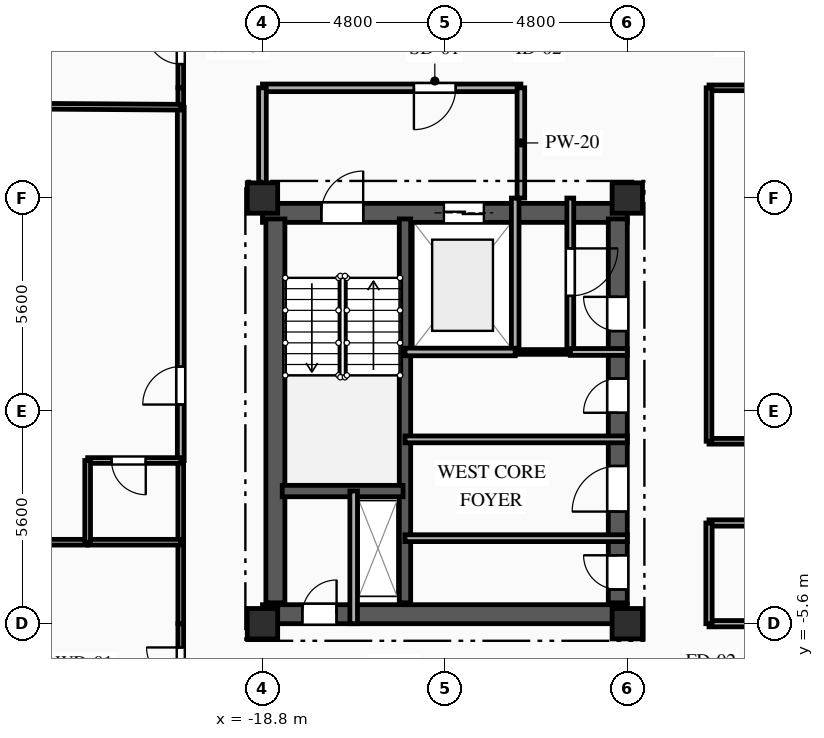
"""IFC4 building model, lengths in metres.
Left out: names, types, materials, properties, quantities, classifications, styles, units other than length and angle.
Written with IfcOpenShell. Run it as: python <this file> out.ifc"""

import sys

from ifc_helpers import new_model, si_unit, direction, frame, frame_2d, origin, origin_2d, place, context, subcontext, project, spatial, rectangle, extrude, element, fill, save


model = new_model("IFC4")
c1 = context("Model", 3, precision=1e-05, world=origin(), true_north=direction((0.0, 1.0)))
c2 = subcontext(c1, "Body", "Model", "MODEL_VIEW")
j1 = project(units=[si_unit("LENGTHUNIT", "METRE"), si_unit("PLANEANGLEUNIT", "RADIAN")], contexts=[c1])
p1 = place(None, origin())
s1 = spatial("IfcSite", under=j1, at=p1, CompositionType="ELEMENT")
p2 = place(p1, origin())
s2 = spatial("IfcBuilding", under=s1, at=p2, CompositionType="ELEMENT")
p3 = place(p2, frame((0.0, 0.0, 213.15)))
s3 = spatial("IfcBuildingStorey", under=s2, at=p3, CompositionType="ELEMENT", Elevation=213.15)
for number, where, z_axis, x_axis in (
    (1, (-18.8, -5.6, 0.0), (0.0, 0.0, 1.0), (1.0, 0.0, 0.0)),
    (2, (-18.8, 5.6, 0.0), (0.0, 0.0, 1.0), (1.0, 0.0, 0.0)),
    (3, (-9.2, -5.6, 0.0), (0.0, 0.0, 1.0), (1.0, 0.0, 0.0)),
    (4, (-9.2, 5.6, 0.0), (0.0, 0.0, 1.0), (1.0, 0.0, 0.0)),
):
    element("IfcColumn", number, at=place(p3, frame(where, z_axis=z_axis, x_axis=x_axis)), inside=s3, PredefinedType="COLUMN", context=c2, shape_type="SweptSolid", body=[
        extrude(rectangle(XDim=0.8, YDim=0.8, at=origin_2d()), origin(), (0.0, 0.0, 1.0), 3.35),
    ])
p4 = place(p3, frame((-18.8, 5.21, 0.0), z_axis=(0.0, 0.0, 1.0), x_axis=(1.0, 0.0, 0.0)))
e5 = element("IfcWall", 5, at=p4, inside=s3, PredefinedType="SHEAR", context=c2, shape_type="SweptSolid", body=[
    extrude(rectangle(XDim=9.6, YDim=0.5, at=frame_2d((4.8, 0.0))), origin(), (0.0, 0.0, 1.0), 3.04),
])
p5 = place(p4, frame((1.55, 0.0, 0.0)))
e6 = element("IfcOpeningElement", 6, at=p5, cuts=e5, PredefinedType="OPENING", context=c2, shape_type="SweptSolid", body=[
    extrude(rectangle(XDim=1.1, YDim=2.15, at=frame_2d((0.55, 1.075))), frame((0.0, 0.26, 0.0), z_axis=(0.0, -1.0, 0.0), x_axis=(1.0, 0.0, 0.0)), (0.0, 0.0, 1.0), 0.52),
])
p6 = place(p4, frame((4.775, 0.0, 0.0)))
e7 = element("IfcOpeningElement", 7, at=p6, cuts=e5, PredefinedType="OPENING", context=c2, shape_type="SweptSolid", body=[
    extrude(rectangle(XDim=1.05, YDim=2.1, at=frame_2d((0.525, 1.05))), frame((0.0, 0.26, 0.0), z_axis=(0.0, -1.0, 0.0), x_axis=(1.0, 0.0, 0.0)), (0.0, 0.0, 1.0), 0.52),
])
p7 = place(p3, frame((-18.8, -5.35, 0.0), z_axis=(0.0, 0.0, 1.0), x_axis=(1.0, 0.0, 0.0)))
e8 = element("IfcWall", 8, at=p7, inside=s3, PredefinedType="SHEAR", context=c2, shape_type="SweptSolid", body=[
    extrude(rectangle(XDim=9.6, YDim=0.5, at=frame_2d((4.8, 0.0))), origin(), (0.0, 0.0, 1.0), 3.04),
])
p8 = place(p7, frame((1.05, 0.0, 0.0)))
e9 = element("IfcOpeningElement", 9, at=p8, cuts=e8, PredefinedType="OPENING", context=c2, shape_type="SweptSolid", body=[
    extrude(rectangle(XDim=0.9, YDim=2.1, at=frame_2d((0.45, 1.05))), frame((0.0, 0.26, 0.0), z_axis=(0.0, -1.0, 0.0), x_axis=(1.0, 0.0, 0.0)), (0.0, 0.0, 1.0), 0.52),
])
p9 = place(p3, frame((-18.46, -5.05, 0.0), z_axis=(0.0, 0.0, 1.0), x_axis=(0.0, 1.0, 0.0)))
e10 = element("IfcWall", 10, at=p9, inside=s3, PredefinedType="SHEAR", context=c2, shape_type="SweptSolid", body=[
    extrude(rectangle(XDim=10.1, YDim=0.5, at=frame_2d((5.05, 0.0))), origin(), (0.0, 0.0, 1.0), 3.04),
])
p10 = place(p3, frame((-9.45, -5.05, 0.0), z_axis=(0.0, 0.0, 1.0), x_axis=(0.0, 1.0, 0.0)))
e11 = element("IfcWall", 11, at=p10, inside=s3, PredefinedType="SHEAR", context=c2, shape_type="SweptSolid", body=[
    extrude(rectangle(XDim=10.1, YDim=0.5, at=frame_2d((5.05, 0.0))), origin(), (0.0, 0.0, 1.0), 3.04),
])
p11 = place(p10, frame((7.15, 0.0, 0.0)))
e12 = element("IfcOpeningElement", 12, at=p11, cuts=e11, PredefinedType="OPENING", context=c2, shape_type="SweptSolid", body=[
    extrude(rectangle(XDim=0.9, YDim=2.1, at=frame_2d((0.45, 1.05))), frame((0.0, 0.26, 0.0), z_axis=(0.0, -1.0, 0.0), x_axis=(1.0, 0.0, 0.0)), (0.0, 0.0, 1.0), 0.52),
])
p12 = place(p10, frame((2.4, 0.0, 0.0)))
e13 = element("IfcOpeningElement", 13, at=p12, cuts=e11, PredefinedType="OPENING", context=c2, shape_type="SweptSolid", body=[
    extrude(rectangle(XDim=1.2, YDim=2.15, at=frame_2d((0.6, 1.075))), frame((0.0, 0.26, 0.0), z_axis=(0.0, -1.0, 0.0), x_axis=(1.0, 0.0, 0.0)), (0.0, 0.0, 1.0), 0.52),
])
p13 = place(p10, frame((0.35, 0.0, 0.0)))
e14 = element("IfcOpeningElement", 14, at=p13, cuts=e11, PredefinedType="OPENING", context=c2, shape_type="SweptSolid", body=[
    extrude(rectangle(XDim=0.9, YDim=2.1, at=frame_2d((0.45, 1.05))), frame((0.0, 0.26, 0.0), z_axis=(0.0, -1.0, 0.0), x_axis=(1.0, 0.0, 0.0)), (0.0, 0.0, 1.0), 0.52),
])
p14 = place(p10, frame((5.0, 0.0, 0.0)))
e15 = element("IfcOpeningElement", 15, at=p14, cuts=e11, PredefinedType="OPENING", context=c2, shape_type="SweptSolid", body=[
    extrude(rectangle(XDim=0.9, YDim=2.1, at=frame_2d((0.45, 1.05))), frame((0.0, 0.26, 0.0), z_axis=(0.0, -1.0, 0.0), x_axis=(1.0, 0.0, 0.0)), (0.0, 0.0, 1.0), 0.52),
])
p15 = place(p3, frame((-15.05, -5.05, 0.0), z_axis=(0.0, 0.0, 1.0), x_axis=(0.0, 1.0, 0.0)))
e16 = element("IfcWall", 16, at=p15, inside=s3, PredefinedType="SHEAR", context=c2, shape_type="SweptSolid", body=[
    extrude(rectangle(XDim=10.1, YDim=0.3, at=frame_2d((5.05, 0.0))), origin(), (0.0, 0.0, 1.0), 3.04),
])
p16 = place(p3, frame((-18.28, -2.11, 0.0), z_axis=(0.0, 0.0, 1.0), x_axis=(1.0, 0.0, 0.0)))
e17 = element("IfcWall", 17, at=p16, inside=s3, PredefinedType="SHEAR", context=c2, shape_type="SweptSolid", body=[
    extrude(rectangle(XDim=3.18, YDim=0.3, at=frame_2d((1.59, 0.0))), origin(), (0.0, 0.0, 1.0), 3.04),
])
p17 = place(p3, frame((-16.4, -5.6, 0.0), z_axis=(0.0, 0.0, 1.0), x_axis=(0.0, 1.0, 0.0)))
e18 = element("IfcWall", 18, at=p17, inside=s3, PredefinedType="PARTITIONING", context=c2, shape_type="SweptSolid", body=[
    extrude(rectangle(XDim=3.49, YDim=0.2, at=frame_2d((1.745, 0.0))), origin(), (0.0, 0.0, 1.0), 3.04),
])
p18 = place(p3, frame((-12.15, 1.55, 0.0), z_axis=(0.0, 0.0, 1.0), x_axis=(0.0, 1.0, 0.0)))
e19 = element("IfcWall", 19, at=p18, inside=s3, PredefinedType="PARTITIONING", context=c2, shape_type="SweptSolid", body=[
    extrude(rectangle(XDim=4.05, YDim=0.2, at=frame_2d((2.025, 0.0))), origin(), (0.0, 0.0, 1.0), 3.04),
])
p19 = place(p3, frame((-12.0, 8.5, 0.0), z_axis=(0.0, 0.0, 1.0), x_axis=(-1.0, 0.0, 0.0)))
e20 = element("IfcWall", 20, at=p19, inside=s3, PredefinedType="PARTITIONING", context=c2, shape_type="SweptSolid", body=[
    extrude(rectangle(XDim=6.8, YDim=0.2, at=frame_2d((3.4, 0.0))), origin(), (0.0, 0.0, 1.0), 3.04),
])
p20 = place(p19, frame((1.715, 0.0, 0.0)))
e21 = element("IfcOpeningElement", 21, at=p20, cuts=e20, PredefinedType="OPENING", context=c2, shape_type="SweptSolid", body=[
    extrude(rectangle(XDim=1.1, YDim=2.15, at=frame_2d((0.55, 1.075))), frame((0.0, 0.11, 0.0), z_axis=(0.0, -1.0, 0.0), x_axis=(1.0, 0.0, 0.0)), (0.0, 0.0, 1.0), 0.22),
])
p21 = place(p3, frame((-18.8, 8.5, 0.0), z_axis=(0.0, 0.0, 1.0), x_axis=(0.0, -1.0, 0.0)))
e22 = element("IfcWall", 22, at=p21, inside=s3, PredefinedType="PARTITIONING", context=c2, shape_type="SweptSolid", body=[
    extrude(rectangle(XDim=2.9, YDim=0.2, at=frame_2d((1.45, 0.0))), origin(), (0.0, 0.0, 1.0), 2.665),
])
p22 = place(p3, frame((-12.0, 5.6, 0.0), z_axis=(0.0, 0.0, 1.0), x_axis=(0.0, 1.0, 0.0)))
e23 = element("IfcWall", 23, at=p22, inside=s3, PredefinedType="PARTITIONING", context=c2, shape_type="SweptSolid", body=[
    extrude(rectangle(XDim=2.9, YDim=0.2, at=frame_2d((1.45, 0.0))), origin(), (0.0, 0.0, 1.0), 3.04),
])
p23 = place(p3, frame((-10.7, 5.6, 0.0), z_axis=(0.0, 0.0, 1.0), x_axis=(0.0, -1.0, 0.0)))
e24 = element("IfcWall", 24, at=p23, inside=s3, PredefinedType="PARTITIONING", context=c2, shape_type="SweptSolid", body=[
    extrude(rectangle(XDim=4.05, YDim=0.18, at=frame_2d((2.025, 0.0))), origin(), (0.0, 0.0, 1.0), 3.04),
])
p24 = place(p23, frame((1.325, 0.0, 0.0)))
e25 = element("IfcOpeningElement", 25, at=p24, cuts=e24, PredefinedType="OPENING", context=c2, shape_type="SweptSolid", body=[
    extrude(rectangle(XDim=1.25, YDim=2.2, at=frame_2d((0.625, 1.1))), frame((0.0, 0.1, 0.0), z_axis=(0.0, -1.0, 0.0), x_axis=(1.0, 0.0, 0.0)), (0.0, 0.0, 1.0), 0.2),
])
p25 = place(p3, frame((-10.7, 1.55, 0.0), z_axis=(0.0, 0.0, 1.0), x_axis=(1.0, 0.0, 0.0)))
e26 = element("IfcWall", 26, at=p25, inside=s3, PredefinedType="PARTITIONING", context=c2, shape_type="SweptSolid", body=[
    extrude(rectangle(XDim=1.5, YDim=0.18, at=frame_2d((0.75, 0.0))), origin(), (0.0, 0.0, 1.0), 3.04),
])
p26 = place(p3, frame((-12.15, 1.55, 0.0), z_axis=(0.0, 0.0, 1.0), x_axis=(1.0, 0.0, 0.0)))
e27 = element("IfcWall", 27, at=p26, inside=s3, PredefinedType="PARTITIONING", context=c2, shape_type="SweptSolid", body=[
    extrude(rectangle(XDim=1.45, YDim=0.125, at=frame_2d((0.725, 0.0))), origin(), (0.0, 0.0, 1.0), 3.04),
])
p27 = place(p3, frame((-15.05, -3.35, 0.0), z_axis=(0.0, 0.0, 1.0), x_axis=(1.0, 0.0, 0.0)))
e28 = element("IfcWall", 28, at=p27, inside=s3, PredefinedType="PARTITIONING", context=c2, shape_type="SweptSolid", body=[
    extrude(rectangle(XDim=5.85, YDim=0.18, at=frame_2d((2.925, 0.0))), origin(), (0.0, 0.0, 1.0), 2.755),
])
p28 = place(p3, frame((-9.2, -0.75, 0.0), z_axis=(0.0, 0.0, 1.0), x_axis=(-1.0, 0.0, 0.0)))
e29 = element("IfcWall", 29, at=p28, inside=s3, PredefinedType="PARTITIONING", context=c2, shape_type="SweptSolid", body=[
    extrude(rectangle(XDim=5.85, YDim=0.18, at=frame_2d((2.925, 0.0))), origin(), (0.0, 0.0, 1.0), 3.04),
])
p29 = place(p3, frame((-20.95, 8.5, 0.0), z_axis=(0.0, 0.0, 1.0), x_axis=(0.0, 1.0, 0.0)))
e30 = element("IfcWall", 30, at=p29, inside=s3, PredefinedType="PARTITIONING", context=c2, shape_type="SweptSolid", body=[
    extrude(rectangle(XDim=2.15, YDim=0.15, at=frame_2d((1.075, 0.0))), origin(), (0.0, 0.0, 1.0), 3.04),
])
p30 = place(p29, frame((0.625, 0.0, 0.0)))
e31 = element("IfcOpeningElement", 31, at=p30, cuts=e30, PredefinedType="OPENING", context=c2, shape_type="SweptSolid", body=[
    extrude(rectangle(XDim=0.9, YDim=2.1, at=frame_2d((0.45, 1.05))), frame((0.0, 0.085, 0.0), z_axis=(0.0, -1.0, 0.0), x_axis=(1.0, 0.0, 0.0)), (0.0, 0.0, 1.0), 0.17),
])
p31 = place(p3, frame((0.0, 8.5, 0.0), z_axis=(0.0, 0.0, 1.0), x_axis=(-1.0, 0.0, 0.0)))
e32 = element("IfcWall", 32, at=p31, inside=s3, PredefinedType="PARTITIONING", context=c2, shape_type="SweptSolid", body=[
    extrude(rectangle(XDim=7.05, YDim=0.15, at=frame_2d((3.525, 0.0))), origin(), (0.0, 0.0, 1.0), 3.04),
])
p32 = place(p3, frame((-20.95, -7.75, 0.0), z_axis=(0.0, 0.0, 1.0), x_axis=(0.0, 1.0, 0.0)))
e33 = element("IfcWall", 33, at=p32, inside=s3, PredefinedType="PARTITIONING", context=c2, shape_type="SweptSolid", body=[
    extrude(rectangle(XDim=2.15, YDim=0.15, at=frame_2d((1.075, 0.0))), origin(), (0.0, 0.0, 1.0), 3.04),
])
p33 = place(p32, frame((0.625, 0.0, 0.0)))
e34 = element("IfcOpeningElement", 34, at=p33, cuts=e33, PredefinedType="OPENING", context=c2, shape_type="SweptSolid", body=[
    extrude(rectangle(XDim=0.9, YDim=2.1, at=frame_2d((0.45, 1.05))), frame((0.0, 0.085, 0.0), z_axis=(0.0, -1.0, 0.0), x_axis=(1.0, 0.0, 0.0)), (0.0, 0.0, 1.0), 0.17),
])
p34 = place(p3, frame((-7.05, -5.6, 0.0), z_axis=(0.0, 0.0, 1.0), x_axis=(1.0, 0.0, 0.0)))
e35 = element("IfcWall", 35, at=p34, inside=s3, PredefinedType="PARTITIONING", context=c2, shape_type="SweptSolid", body=[
    extrude(rectangle(XDim=7.05, YDim=0.165, at=frame_2d((3.525, 0.0))), origin(), (0.0, 0.0, 1.0), 2.525),
])
p35 = place(p3, frame((-20.95, -5.6, 0.0), z_axis=(0.0, 0.0, 1.0), x_axis=(0.0, 1.0, 0.0)))
e36 = element("IfcWall", 36, at=p35, inside=s3, PredefinedType="PARTITIONING", context=c2, shape_type="SweptSolid", body=[
    extrude(rectangle(XDim=2.144, YDim=0.15, at=frame_2d((1.072, 0.0))), origin(), (0.0, 0.0, 1.0), 3.04),
])
p36 = place(p3, frame((-20.95, -1.306, 0.0), z_axis=(0.0, 0.0, 1.0), x_axis=(0.0, 1.0, 0.0)))
e37 = element("IfcWall", 37, at=p36, inside=s3, PredefinedType="PARTITIONING", context=c2, shape_type="SweptSolid", body=[
    extrude(rectangle(XDim=9.296, YDim=0.18, at=frame_2d((4.648, 0.0))), origin(), (0.0, 0.0, 1.0), 3.04),
])
p37 = place(p36, frame((1.472, 0.0, 0.0)))
e38 = element("IfcOpeningElement", 38, at=p37, cuts=e37, PredefinedType="OPENING", context=c2, shape_type="SweptSolid", body=[
    extrude(rectangle(XDim=1.0, YDim=2.15, at=frame_2d((0.5, 1.075))), frame((0.0, 0.1, 0.0), z_axis=(0.0, -1.0, 0.0), x_axis=(1.0, 0.0, 0.0)), (0.0, 0.0, 1.0), 0.2),
])
p38 = place(p3, frame((-20.95, -3.456, 0.0), z_axis=(0.0, 0.0, 1.0), x_axis=(0.0, 1.0, 0.0)))
e39 = element("IfcWall", 39, at=p38, inside=s3, PredefinedType="PLUMBINGWALL", context=c2, shape_type="SweptSolid", body=[
    extrude(rectangle(XDim=2.15, YDim=0.15, at=frame_2d((1.075, 0.0))), origin(), (0.0, 0.0, 1.0), 3.04),
])
p39 = place(p3, frame((-20.95, 7.99, 0.0), z_axis=(0.0, 0.0, 1.0), x_axis=(0.0, 1.0, 0.0)))
e40 = element("IfcWall", 40, at=p39, inside=s3, PredefinedType="PARTITIONING", context=c2, shape_type="SweptSolid", body=[
    extrude(rectangle(XDim=0.51, YDim=0.15, at=frame_2d((0.255, 0.0))), origin(), (0.0, 0.0, 1.0), 3.04),
])
p40 = place(p3, frame((-7.05, -0.8, 0.0), z_axis=(0.0, 0.0, 1.0), x_axis=(1.0, 0.0, 0.0)))
e41 = element("IfcWall", 41, at=p40, inside=s3, PredefinedType="PARTITIONING", context=c2, shape_type="SweptSolid", body=[
    extrude(rectangle(XDim=14.1, YDim=0.15, at=frame_2d((7.05, 0.0))), origin(), (0.0, 0.0, 1.0), 3.04),
])
p41 = place(p40, frame((6.525, 0.0, 0.0)))
e42 = element("IfcOpeningElement", 42, at=p41, cuts=e41, PredefinedType="OPENING", context=c2, shape_type="SweptSolid", body=[
    extrude(rectangle(XDim=1.05, YDim=2.15, at=frame_2d((0.525, 1.075))), frame((0.0, 0.085, 0.0), z_axis=(0.0, -1.0, 0.0), x_axis=(1.0, 0.0, 0.0)), (0.0, 0.0, 1.0), 0.17),
])
p42 = place(p3, frame((7.05, -2.95, 0.0), z_axis=(0.0, 0.0, 1.0), x_axis=(-1.0, 0.0, 0.0)))
e43 = element("IfcWall", 43, at=p42, inside=s3, PredefinedType="PARTITIONING", context=c2, shape_type="SweptSolid", body=[
    extrude(rectangle(XDim=14.1, YDim=0.165, at=frame_2d((7.05, 0.0))), origin(), (0.0, 0.0, 1.0), 3.04),
])
p43 = place(p42, frame((6.475, 0.0, 0.0)))
e44 = element("IfcOpeningElement", 44, at=p43, cuts=e43, PredefinedType="OPENING", context=c2, shape_type="SweptSolid", body=[
    extrude(rectangle(XDim=1.15, YDim=2.15, at=frame_2d((0.575, 1.075))), frame((0.0, 0.093, 0.0), z_axis=(0.0, -1.0, 0.0), x_axis=(1.0, 0.0, 0.0)), (0.0, 0.0, 1.0), 0.185),
])
p44 = place(p3, frame((-7.05, 8.5, 0.0), z_axis=(0.0, 0.0, 1.0), x_axis=(0.0, -1.0, 0.0)))
e45 = element("IfcWall", 45, at=p44, inside=s3, PredefinedType="PARTITIONING", context=c2, shape_type="SweptSolid", body=[
    extrude(rectangle(XDim=9.3, YDim=0.15, at=frame_2d((4.65, 0.0))), origin(), (0.0, 0.0, 1.0), 3.04),
])
p45 = place(p3, frame((-7.05, -2.95, 0.0), z_axis=(0.0, 0.0, 1.0), x_axis=(0.0, -1.0, 0.0)))
e46 = element("IfcWall", 46, at=p45, inside=s3, PredefinedType="PARTITIONING", context=c2, shape_type="SweptSolid", body=[
    extrude(rectangle(XDim=2.65, YDim=0.165, at=frame_2d((1.325, 0.0))), origin(), (0.0, 0.0, 1.0), 3.04),
])
p46 = place(p3, frame((-24.976, -3.456, 0.0), z_axis=(0.0, 0.0, 1.0), x_axis=(1.0, 0.0, 0.0)))
e47 = element("IfcWall", 47, at=p46, inside=s3, PredefinedType="PARTITIONING", context=c2, shape_type="SweptSolid", body=[
    extrude(rectangle(XDim=1.576, YDim=0.15, at=frame_2d((0.788, 0.0))), origin(), (0.0, 0.0, 1.0), 3.04),
])
p47 = place(p3, frame((-23.4, -3.456, 0.0), z_axis=(0.0, 0.0, 1.0), x_axis=(1.0, 0.0, 0.0)))
e48 = element("IfcWall", 48, at=p47, inside=s3, PredefinedType="PLUMBINGWALL", context=c2, shape_type="SweptSolid", body=[
    extrude(rectangle(XDim=2.45, YDim=0.15, at=frame_2d((1.225, 0.0))), origin(), (0.0, 0.0, 1.0), 3.04),
])
p48 = place(p3, frame((-20.95, -1.306, 0.0), z_axis=(0.0, 0.0, 1.0), x_axis=(-1.0, 0.0, 0.0)))
e49 = element("IfcWall", 49, at=p48, inside=s3, PredefinedType="PLUMBINGWALL", context=c2, shape_type="SweptSolid", body=[
    extrude(rectangle(XDim=2.45, YDim=0.15, at=frame_2d((1.225, 0.0))), origin(), (0.0, 0.0, 1.0), 3.04),
])
p49 = place(p48, frame((0.921, 0.0, 0.0)))
e50 = element("IfcOpeningElement", 50, at=p49, cuts=e49, PredefinedType="OPENING", context=c2, shape_type="SweptSolid", body=[
    extrude(rectangle(XDim=0.9, YDim=2.1, at=frame_2d((0.45, 1.05))), frame((0.0, 0.085, 0.0), z_axis=(0.0, -1.0, 0.0), x_axis=(1.0, 0.0, 0.0)), (0.0, 0.0, 1.0), 0.17),
])
p50 = place(p3, frame((-23.4, -1.306, 0.0), z_axis=(0.0, 0.0, 1.0), x_axis=(0.0, -1.0, 0.0)))
e51 = element("IfcWall", 51, at=p50, inside=s3, PredefinedType="PLUMBINGWALL", context=c2, shape_type="SweptSolid", body=[
    extrude(rectangle(XDim=2.15, YDim=0.15, at=frame_2d((1.075, 0.0))), origin(), (0.0, 0.0, 1.0), 2.695),
])
p51 = place(p3, frame((-27.419, 8.034, 0.0), z_axis=(0.0, 0.0, 1.0), x_axis=(0.999976928608, -0.006792808784, 0.0)))
e52 = element("IfcWall", 52, at=p51, inside=s3, PredefinedType="PARTITIONING", context=c2, shape_type="SweptSolid", body=[
    extrude(rectangle(XDim=6.469, YDim=0.15, at=frame_2d((3.235, 0.0))), origin(), (0.0, 0.0, 1.0), 3.04),
])
p52 = place(p3, frame((-15.05, 1.55, 0.0), z_axis=(0.0, 0.0, 1.0), x_axis=(1.0, 0.0, 0.0)))
e53 = element("IfcWall", 53, at=p52, inside=s3, PredefinedType="PARTITIONING", context=c2, shape_type="SweptSolid", body=[
    extrude(rectangle(XDim=2.9, YDim=0.2, at=frame_2d((1.45, 0.0))), origin(), (0.0, 0.0, 1.0), 3.04),
])
p53 = place(p5, origin())
e54 = element("IfcDoor", 54, at=p53, inside=s3, OperationType="SINGLE_SWING_RIGHT", PredefinedType="DOOR", context=c2, shape_type="SweptSolid", body=[
    extrude(rectangle(XDim=1.1, YDim=2.15, at=frame_2d((0.55, 1.075))), frame((0.0, 0.025, 0.0), z_axis=(0.0, -1.0, 0.0), x_axis=(1.0, 0.0, 0.0)), (0.0, 0.0, 1.0), 0.05),
])
fill(e6, e54)
p54 = place(p6, origin())
e55 = element("IfcDoor", 55, at=p54, inside=s3, OperationType="DOUBLE_DOOR_SLIDING", PredefinedType="DOOR", context=c2, shape_type="SweptSolid", body=[
    extrude(rectangle(XDim=1.05, YDim=2.1, at=frame_2d((0.525, 1.05))), frame((0.0, 0.025, 0.0), z_axis=(0.0, -1.0, 0.0), x_axis=(1.0, 0.0, 0.0)), (0.0, 0.0, 1.0), 0.05),
])
fill(e7, e55)
p55 = place(p8, origin())
e56 = element("IfcDoor", 56, at=p55, inside=s3, OperationType="SINGLE_SWING_RIGHT", PredefinedType="DOOR", context=c2, shape_type="SweptSolid", body=[
    extrude(rectangle(XDim=0.9, YDim=2.1, at=frame_2d((0.45, 1.05))), frame((0.0, 0.025, 0.0), z_axis=(0.0, -1.0, 0.0), x_axis=(1.0, 0.0, 0.0)), (0.0, 0.0, 1.0), 0.05),
])
fill(e9, e56)
p56 = place(p20, origin())
e57 = element("IfcDoor", 57, at=p56, inside=s3, OperationType="SINGLE_SWING_RIGHT", PredefinedType="DOOR", context=c2, shape_type="SweptSolid", body=[
    extrude(rectangle(XDim=1.1, YDim=2.15, at=frame_2d((0.55, 1.075))), frame((0.0, 0.025, 0.0), z_axis=(0.0, -1.0, 0.0), x_axis=(1.0, 0.0, 0.0)), (0.0, 0.0, 1.0), 0.05),
])
fill(e21, e57)
p57 = place(p24, origin())
e58 = element("IfcDoor", 58, at=p57, inside=s3, OperationType="SINGLE_SWING_LEFT", PredefinedType="DOOR", context=c2, shape_type="SweptSolid", body=[
    extrude(rectangle(XDim=1.25, YDim=2.2, at=frame_2d((0.625, 1.1))), frame((0.0, 0.025, 0.0), z_axis=(0.0, -1.0, 0.0), x_axis=(1.0, 0.0, 0.0)), (0.0, 0.0, 1.0), 0.05),
])
fill(e25, e58)
p58 = place(p11, origin())
e59 = element("IfcDoor", 59, at=p58, inside=s3, OperationType="SINGLE_SWING_RIGHT", PredefinedType="DOOR", context=c2, shape_type="SweptSolid", body=[
    extrude(rectangle(XDim=0.9, YDim=2.1, at=frame_2d((0.45, 1.05))), frame((0.0, 0.025, 0.0), z_axis=(0.0, -1.0, 0.0), x_axis=(1.0, 0.0, 0.0)), (0.0, 0.0, 1.0), 0.05),
])
fill(e12, e59)
p59 = place(p12, origin())
e60 = element("IfcDoor", 60, at=p59, inside=s3, OperationType="SINGLE_SWING_LEFT", PredefinedType="DOOR", context=c2, shape_type="SweptSolid", body=[
    extrude(rectangle(XDim=1.2, YDim=2.15, at=frame_2d((0.6, 1.075))), frame((0.0, 0.025, 0.0), z_axis=(0.0, -1.0, 0.0), x_axis=(1.0, 0.0, 0.0)), (0.0, 0.0, 1.0), 0.05),
])
fill(e13, e60)
p60 = place(p13, origin())
e61 = element("IfcDoor", 61, at=p60, inside=s3, OperationType="SINGLE_SWING_RIGHT", PredefinedType="DOOR", context=c2, shape_type="SweptSolid", body=[
    extrude(rectangle(XDim=0.9, YDim=2.1, at=frame_2d((0.45, 1.05))), frame((0.0, 0.025, 0.0), z_axis=(0.0, -1.0, 0.0), x_axis=(1.0, 0.0, 0.0)), (0.0, 0.0, 1.0), 0.05),
])
fill(e14, e61)
p61 = place(p14, origin())
e62 = element("IfcDoor", 62, at=p61, inside=s3, OperationType="SINGLE_SWING_LEFT", PredefinedType="DOOR", context=c2, shape_type="SweptSolid", body=[
    extrude(rectangle(XDim=0.9, YDim=2.1, at=frame_2d((0.45, 1.05))), frame((0.0, 0.025, 0.0), z_axis=(0.0, -1.0, 0.0), x_axis=(1.0, 0.0, 0.0)), (0.0, 0.0, 1.0), 0.05),
])
fill(e15, e62)
p62 = place(p30, origin())
e63 = element("IfcDoor", 63, at=p62, inside=s3, OperationType="SINGLE_SWING_RIGHT", PredefinedType="DOOR", context=c2, shape_type="SweptSolid", body=[
    extrude(rectangle(XDim=0.9, YDim=2.1, at=frame_2d((0.45, 1.05))), frame((0.0, 0.025, 0.0), z_axis=(0.0, -1.0, 0.0), x_axis=(1.0, 0.0, 0.0)), (0.0, 0.0, 1.0), 0.05),
])
fill(e31, e63)
p63 = place(p33, origin())
e64 = element("IfcDoor", 64, at=p63, inside=s3, OperationType="SINGLE_SWING_RIGHT", PredefinedType="DOOR", context=c2, shape_type="SweptSolid", body=[
    extrude(rectangle(XDim=0.9, YDim=2.1, at=frame_2d((0.45, 1.05))), frame((0.0, 0.025, 0.0), z_axis=(0.0, -1.0, 0.0), x_axis=(1.0, 0.0, 0.0)), (0.0, 0.0, 1.0), 0.05),
])
fill(e34, e64)
p64 = place(p37, origin())
e65 = element("IfcDoor", 65, at=p64, inside=s3, OperationType="SINGLE_SWING_LEFT", PredefinedType="DOOR", context=c2, shape_type="SweptSolid", body=[
    extrude(rectangle(XDim=1.0, YDim=2.15, at=frame_2d((0.5, 1.075))), frame((0.0, 0.025, 0.0), z_axis=(0.0, -1.0, 0.0), x_axis=(1.0, 0.0, 0.0)), (0.0, 0.0, 1.0), 0.05),
])
fill(e38, e65)
p65 = place(p49, origin())
e66 = element("IfcDoor", 66, at=p65, inside=s3, OperationType="SINGLE_SWING_LEFT", PredefinedType="DOOR", context=c2, shape_type="SweptSolid", body=[
    extrude(rectangle(XDim=0.9, YDim=2.1, at=frame_2d((0.45, 1.05))), frame((0.0, 0.025, 0.0), z_axis=(0.0, -1.0, 0.0), x_axis=(1.0, 0.0, 0.0)), (0.0, 0.0, 1.0), 0.05),
])
fill(e50, e66)
save(model, sys.argv[1])
